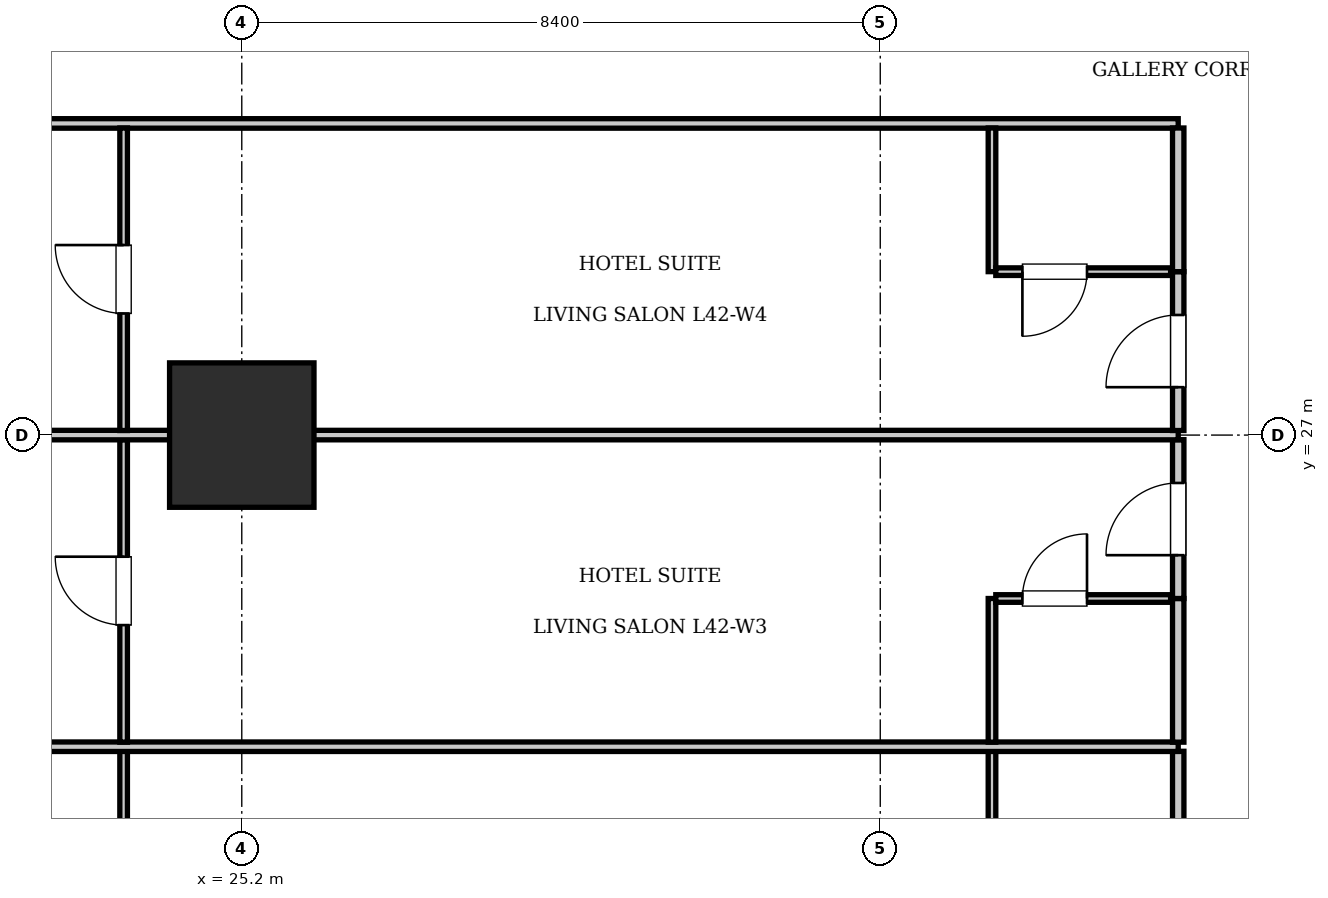
"""IFC4 building model, lengths in metres.
Left out: names, types, materials, properties, quantities, classifications, styles, units other than length and angle.
Written with IfcOpenShell. Run it as: python <this file> out.ifc"""

import sys

from ifc_helpers import new_model, si_unit, direction, frame, frame_2d, origin, origin_2d, place, context, subcontext, project, spatial, rectangle, extrude, element, fill, save


model = new_model("IFC4")
c1 = context("Model", 3, precision=1e-05, world=origin(), true_north=direction((0.0, 1.0)))
c2 = subcontext(c1, "Body", "Model", "MODEL_VIEW")
j1 = project(units=[si_unit("LENGTHUNIT", "METRE"), si_unit("PLANEANGLEUNIT", "RADIAN")], contexts=[c1])
p1 = place(None, origin())
s1 = spatial("IfcSite", under=j1, at=p1, CompositionType="ELEMENT")
p2 = place(p1, origin())
s2 = spatial("IfcBuilding", under=s1, at=p2, CompositionType="ELEMENT")
p3 = place(p2, frame((0.0, 0.0, 173.6)))
s3 = spatial("IfcBuildingStorey", under=s2, at=p3, CompositionType="ELEMENT", Elevation=173.6)
p4 = place(p3, frame((25.2, 27.0, 0.0), z_axis=(0.0, 0.0, 1.0), x_axis=(1.0, 0.0, 0.0)))
e1 = element("IfcColumn", 1, at=p4, inside=s3, PredefinedType="COLUMN", context=c2, shape_type="SweptSolid", body=[
    extrude(rectangle(XDim=1.9, YDim=1.9, at=origin_2d()), origin(), (0.0, 0.0, 1.0), 3.85),
])
p5 = place(p3, frame((13.2, 31.1, 0.0), z_axis=(0.0, 0.0, 1.0), x_axis=(1.0, 0.0, 0.0)))
e2 = element("IfcWall", 2, at=p5, inside=s3, PredefinedType="PARTITIONING", context=c2, shape_type="SweptSolid", body=[
    extrude(rectangle(XDim=24.32, YDim=0.125, at=frame_2d((12.16, 0.0))), origin(), (0.0, 0.0, 1.0), 3.61),
])
p6 = place(p3, frame((37.52, 20.95, 0.0), z_axis=(0.0, 0.0, 1.0), x_axis=(0.0, 1.0, 0.0)))
e3 = element("IfcWall", 3, at=p6, inside=s3, PredefinedType="PARTITIONING", context=c2, shape_type="SweptSolid", body=[
    extrude(rectangle(XDim=1.89, YDim=0.15, at=frame_2d((0.945, 0.0))), origin(), (0.0, 0.0, 1.0), 3.61),
])
p7 = place(p3, frame((35.07, 20.95, 0.0), z_axis=(0.0, 0.0, 1.0), x_axis=(0.0, 1.0, 0.0)))
e4 = element("IfcWall", 4, at=p7, inside=s3, PredefinedType="PARTITIONING", context=c2, shape_type="SweptSolid", body=[
    extrude(rectangle(XDim=1.89, YDim=0.1, at=frame_2d((0.945, 0.0))), origin(), (0.0, 0.0, 1.0), 3.61),
])
p8 = place(p3, frame((23.646, 18.86, 0.0), z_axis=(0.0, 0.0, 1.0), x_axis=(0.0, 1.0, 0.0)))
e5 = element("IfcWall", 5, at=p8, inside=s3, PredefinedType="PARTITIONING", context=c2, shape_type="SweptSolid", body=[
    extrude(rectangle(XDim=3.98, YDim=0.1, at=frame_2d((1.99, 0.0))), origin(), (0.0, 0.0, 1.0), 3.61),
])
p9 = place(p8, frame((1.54, 0.0, 0.0)))
e6 = element("IfcOpeningElement", 6, at=p9, cuts=e5, PredefinedType="OPENING", context=c2, shape_type="SweptSolid", body=[
    extrude(rectangle(XDim=0.9, YDim=2.1, at=frame_2d((0.45, 1.05))), frame((0.0, 0.06, 0.0), z_axis=(0.0, -1.0, 0.0), x_axis=(1.0, 0.0, 0.0)), (0.0, 0.0, 1.0), 0.12),
])
p10 = place(p3, frame((13.2, 22.9, 0.0), z_axis=(0.0, 0.0, 1.0), x_axis=(1.0, 0.0, 0.0)))
e7 = element("IfcWall", 7, at=p10, inside=s3, PredefinedType="PARTITIONING", context=c2, shape_type="SweptSolid", body=[
    extrude(rectangle(XDim=24.32, YDim=0.125, at=frame_2d((12.16, 0.0))), origin(), (0.0, 0.0, 1.0), 3.61),
])
p11 = place(p3, frame((37.52, 22.96, 0.0), z_axis=(0.0, 0.0, 1.0), x_axis=(0.0, 1.0, 0.0)))
e8 = element("IfcWall", 8, at=p11, inside=s3, PredefinedType="PARTITIONING", context=c2, shape_type="SweptSolid", body=[
    extrude(rectangle(XDim=1.89, YDim=0.15, at=frame_2d((0.945, 0.0))), origin(), (0.0, 0.0, 1.0), 3.61),
])
p12 = place(p3, frame((37.52, 24.85, 0.0), z_axis=(0.0, 0.0, 1.0), x_axis=(0.0, 1.0, 0.0)))
e9 = element("IfcWall", 9, at=p12, inside=s3, PredefinedType="PARTITIONING", context=c2, shape_type="SweptSolid", body=[
    extrude(rectangle(XDim=2.09, YDim=0.15, at=frame_2d((1.045, 0.0))), origin(), (0.0, 0.0, 1.0), 3.61),
])
p13 = place(p12, frame((0.57, 0.0, 0.0)))
e10 = element("IfcOpeningElement", 10, at=p13, cuts=e9, PredefinedType="OPENING", context=c2, shape_type="SweptSolid", body=[
    extrude(rectangle(XDim=0.95, YDim=2.15, at=frame_2d((0.475, 1.075))), frame((0.0, 0.085, 0.0), z_axis=(0.0, -1.0, 0.0), x_axis=(1.0, 0.0, 0.0)), (0.0, 0.0, 1.0), 0.17),
])
p14 = place(p3, frame((35.07, 22.96, 0.0), z_axis=(0.0, 0.0, 1.0), x_axis=(0.0, 1.0, 0.0)))
e11 = element("IfcWall", 11, at=p14, inside=s3, PredefinedType="PARTITIONING", context=c2, shape_type="SweptSolid", body=[
    extrude(rectangle(XDim=1.89, YDim=0.1, at=frame_2d((0.945, 0.0))), origin(), (0.0, 0.0, 1.0), 3.61),
])
p15 = place(p3, frame((35.12, 24.85, 0.0), z_axis=(0.0, 0.0, 1.0), x_axis=(1.0, 0.0, 0.0)))
e12 = element("IfcWall", 12, at=p15, inside=s3, PredefinedType="PARTITIONING", context=c2, shape_type="SweptSolid", body=[
    extrude(rectangle(XDim=2.3, YDim=0.1, at=frame_2d((1.15, 0.0))), origin(), (0.0, 0.0, 1.0), 3.61),
])
p16 = place(p15, frame((0.35, 0.0, 0.0)))
e13 = element("IfcOpeningElement", 13, at=p16, cuts=e12, PredefinedType="OPENING", context=c2, shape_type="SweptSolid", body=[
    extrude(rectangle(XDim=0.85, YDim=2.1, at=frame_2d((0.425, 1.05))), frame((0.0, 0.06, 0.0), z_axis=(0.0, -1.0, 0.0), x_axis=(1.0, 0.0, 0.0)), (0.0, 0.0, 1.0), 0.12),
])
p17 = place(p3, frame((23.646, 22.96, 0.0), z_axis=(0.0, 0.0, 1.0), x_axis=(0.0, 1.0, 0.0)))
e14 = element("IfcWall", 14, at=p17, inside=s3, PredefinedType="PARTITIONING", context=c2, shape_type="SweptSolid", body=[
    extrude(rectangle(XDim=3.98, YDim=0.1, at=frame_2d((1.99, 0.0))), origin(), (0.0, 0.0, 1.0), 3.61),
])
p18 = place(p17, frame((1.54, 0.0, 0.0)))
e15 = element("IfcOpeningElement", 15, at=p18, cuts=e14, PredefinedType="OPENING", context=c2, shape_type="SweptSolid", body=[
    extrude(rectangle(XDim=0.9, YDim=2.1, at=frame_2d((0.45, 1.05))), frame((0.0, 0.06, 0.0), z_axis=(0.0, -1.0, 0.0), x_axis=(1.0, 0.0, 0.0)), (0.0, 0.0, 1.0), 0.12),
])
p19 = place(p3, frame((13.2, 27.0, 0.0), z_axis=(0.0, 0.0, 1.0), x_axis=(1.0, 0.0, 0.0)))
e16 = element("IfcWall", 16, at=p19, inside=s3, PredefinedType="PARTITIONING", context=c2, shape_type="SweptSolid", body=[
    extrude(rectangle(XDim=24.32, YDim=0.125, at=frame_2d((12.16, 0.0))), origin(), (0.0, 0.0, 1.0), 2.41),
])
p20 = place(p3, frame((37.52, 27.06, 0.0), z_axis=(0.0, 0.0, 1.0), x_axis=(0.0, 1.0, 0.0)))
e17 = element("IfcWall", 17, at=p20, inside=s3, PredefinedType="PARTITIONING", context=c2, shape_type="SweptSolid", body=[
    extrude(rectangle(XDim=2.09, YDim=0.15, at=frame_2d((1.045, 0.0))), origin(), (0.0, 0.0, 1.0), 3.61),
])
p21 = place(p20, frame((0.57, 0.0, 0.0)))
e18 = element("IfcOpeningElement", 18, at=p21, cuts=e17, PredefinedType="OPENING", context=c2, shape_type="SweptSolid", body=[
    extrude(rectangle(XDim=0.95, YDim=2.15, at=frame_2d((0.475, 1.075))), frame((0.0, 0.085, 0.0), z_axis=(0.0, -1.0, 0.0), x_axis=(1.0, 0.0, 0.0)), (0.0, 0.0, 1.0), 0.17),
])
p22 = place(p3, frame((37.52, 29.15, 0.0), z_axis=(0.0, 0.0, 1.0), x_axis=(0.0, 1.0, 0.0)))
e19 = element("IfcWall", 19, at=p22, inside=s3, PredefinedType="PARTITIONING", context=c2, shape_type="SweptSolid", body=[
    extrude(rectangle(XDim=1.89, YDim=0.15, at=frame_2d((0.945, 0.0))), origin(), (0.0, 0.0, 1.0), 3.61),
])
p23 = place(p3, frame((35.07, 29.15, 0.0), z_axis=(0.0, 0.0, 1.0), x_axis=(0.0, 1.0, 0.0)))
e20 = element("IfcWall", 20, at=p23, inside=s3, PredefinedType="PARTITIONING", context=c2, shape_type="SweptSolid", body=[
    extrude(rectangle(XDim=1.89, YDim=0.1, at=frame_2d((0.945, 0.0))), origin(), (0.0, 0.0, 1.0), 3.61),
])
p24 = place(p3, frame((35.12, 29.15, 0.0), z_axis=(0.0, 0.0, 1.0), x_axis=(1.0, 0.0, 0.0)))
e21 = element("IfcWall", 21, at=p24, inside=s3, PredefinedType="PARTITIONING", context=c2, shape_type="SweptSolid", body=[
    extrude(rectangle(XDim=2.3, YDim=0.1, at=frame_2d((1.15, 0.0))), origin(), (0.0, 0.0, 1.0), 3.61),
])
p25 = place(p24, frame((0.35, 0.0, 0.0)))
e22 = element("IfcOpeningElement", 22, at=p25, cuts=e21, PredefinedType="OPENING", context=c2, shape_type="SweptSolid", body=[
    extrude(rectangle(XDim=0.85, YDim=2.1, at=frame_2d((0.425, 1.05))), frame((0.0, 0.06, 0.0), z_axis=(0.0, -1.0, 0.0), x_axis=(1.0, 0.0, 0.0)), (0.0, 0.0, 1.0), 0.12),
])
p26 = place(p3, frame((23.646, 27.06, 0.0), z_axis=(0.0, 0.0, 1.0), x_axis=(0.0, 1.0, 0.0)))
e23 = element("IfcWall", 23, at=p26, inside=s3, PredefinedType="PARTITIONING", context=c2, shape_type="SweptSolid", body=[
    extrude(rectangle(XDim=3.98, YDim=0.1, at=frame_2d((1.99, 0.0))), origin(), (0.0, 0.0, 1.0), 3.61),
])
p27 = place(p26, frame((1.54, 0.0, 0.0)))
e24 = element("IfcOpeningElement", 24, at=p27, cuts=e23, PredefinedType="OPENING", context=c2, shape_type="SweptSolid", body=[
    extrude(rectangle(XDim=0.9, YDim=2.1, at=frame_2d((0.45, 1.05))), frame((0.0, 0.06, 0.0), z_axis=(0.0, -1.0, 0.0), x_axis=(1.0, 0.0, 0.0)), (0.0, 0.0, 1.0), 0.12),
])
p28 = place(p16, origin())
e25 = element("IfcDoor", 25, at=p28, inside=s3, OperationType="SINGLE_SWING_RIGHT", PredefinedType="DOOR", context=c2, shape_type="SweptSolid", body=[
    extrude(rectangle(XDim=0.85, YDim=2.1, at=frame_2d((0.425, 1.05))), frame((0.0, 0.025, 0.0), z_axis=(0.0, -1.0, 0.0), x_axis=(1.0, 0.0, 0.0)), (0.0, 0.0, 1.0), 0.05),
])
fill(e13, e25)
p29 = place(p13, origin())
e26 = element("IfcDoor", 26, at=p29, inside=s3, OperationType="SINGLE_SWING_LEFT", PredefinedType="DOOR", context=c2, shape_type="SweptSolid", body=[
    extrude(rectangle(XDim=0.95, YDim=2.15, at=frame_2d((0.475, 1.075))), frame((0.0, 0.025, 0.0), z_axis=(0.0, -1.0, 0.0), x_axis=(1.0, 0.0, 0.0)), (0.0, 0.0, 1.0), 0.05),
])
fill(e10, e26)
p30 = place(p18, origin())
e27 = element("IfcDoor", 27, at=p30, inside=s3, OperationType="SINGLE_SWING_RIGHT", PredefinedType="DOOR", context=c2, shape_type="SweptSolid", body=[
    extrude(rectangle(XDim=0.9, YDim=2.1, at=frame_2d((0.45, 1.05))), frame((0.0, 0.025, 0.0), z_axis=(0.0, -1.0, 0.0), x_axis=(1.0, 0.0, 0.0)), (0.0, 0.0, 1.0), 0.05),
])
fill(e15, e27)
p31 = place(p25, frame((0.85, 0.0, 0.0), z_axis=(0.0, 0.0, 1.0), x_axis=(-1.0, 0.0, 0.0)))
e28 = element("IfcDoor", 28, at=p31, inside=s3, OperationType="SINGLE_SWING_RIGHT", PredefinedType="DOOR", context=c2, shape_type="SweptSolid", body=[
    extrude(rectangle(XDim=0.85, YDim=2.1, at=frame_2d((0.425, 1.05))), frame((0.0, 0.025, 0.0), z_axis=(0.0, -1.0, 0.0), x_axis=(1.0, 0.0, 0.0)), (0.0, 0.0, 1.0), 0.05),
])
fill(e22, e28)
p32 = place(p21, origin())
e29 = element("IfcDoor", 29, at=p32, inside=s3, OperationType="SINGLE_SWING_LEFT", PredefinedType="DOOR", context=c2, shape_type="SweptSolid", body=[
    extrude(rectangle(XDim=0.95, YDim=2.15, at=frame_2d((0.475, 1.075))), frame((0.0, 0.025, 0.0), z_axis=(0.0, -1.0, 0.0), x_axis=(1.0, 0.0, 0.0)), (0.0, 0.0, 1.0), 0.05),
])
fill(e18, e29)
p33 = place(p27, origin())
e30 = element("IfcDoor", 30, at=p33, inside=s3, OperationType="SINGLE_SWING_RIGHT", PredefinedType="DOOR", context=c2, shape_type="SweptSolid", body=[
    extrude(rectangle(XDim=0.9, YDim=2.1, at=frame_2d((0.45, 1.05))), frame((0.0, 0.025, 0.0), z_axis=(0.0, -1.0, 0.0), x_axis=(1.0, 0.0, 0.0)), (0.0, 0.0, 1.0), 0.05),
])
fill(e24, e30)
save(model, sys.argv[1])
